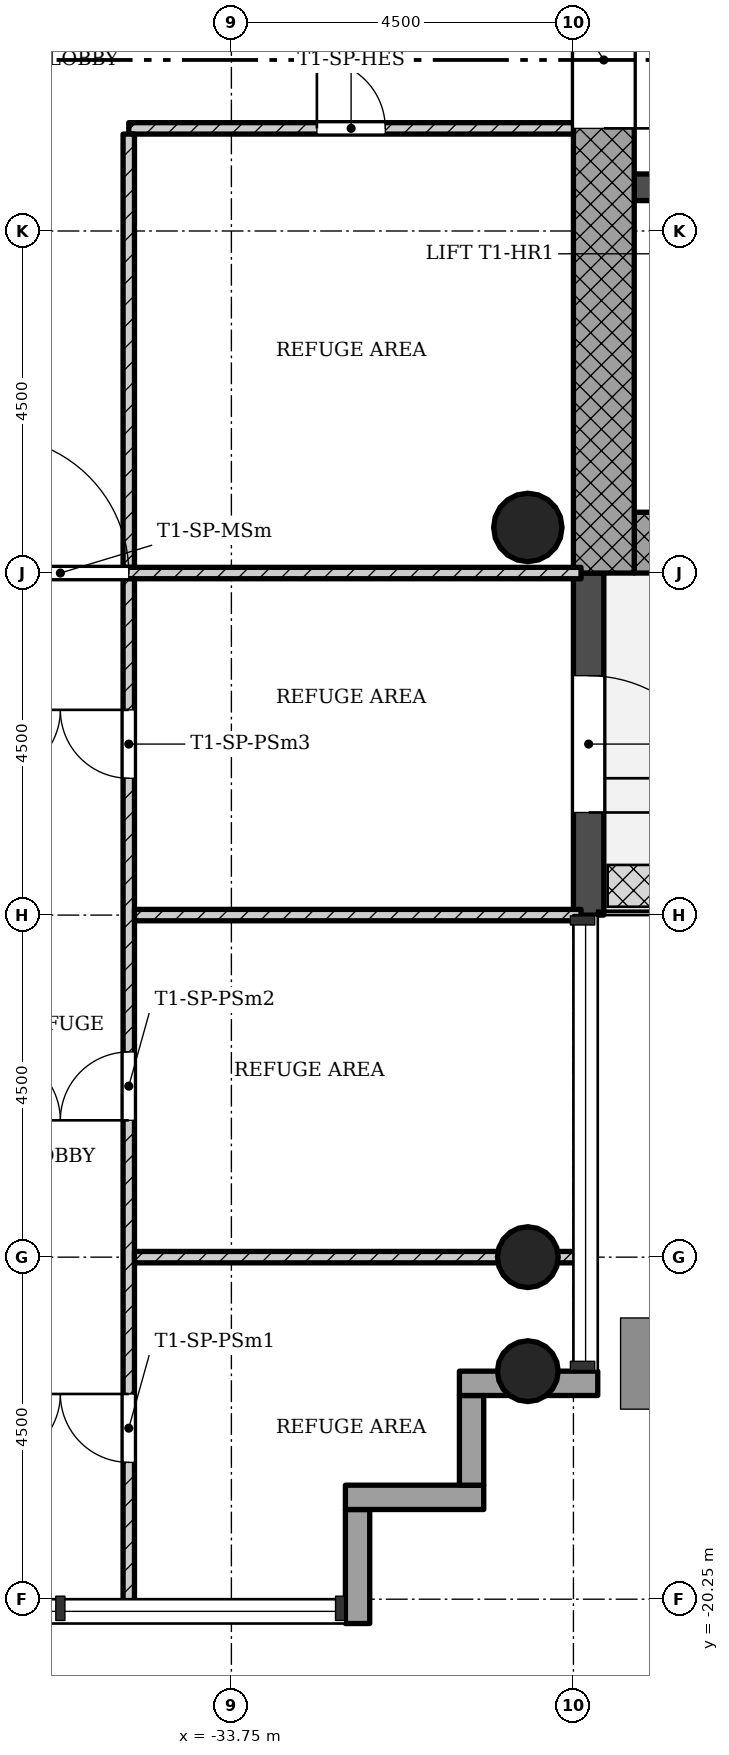
"""IFC4 building model, lengths in metres.
Left out: names, types, materials, properties, quantities, classifications, styles, units other than length and angle.
Written with IfcOpenShell. Run it as: python <this file> out.ifc"""

import sys

from ifc_helpers import new_model, si_unit, direction, frame, frame_2d, origin, origin_2d, place, context, subcontext, project, spatial, rectangle, hollow_circle, extrude, element, fill, save


model = new_model("IFC4")
c1 = context("Model", 3, precision=1e-05, world=origin(), true_north=direction((0.0, 1.0)))
c2 = subcontext(c1, "Body", "Model", "MODEL_VIEW")
j1 = project(units=[si_unit("LENGTHUNIT", "METRE"), si_unit("PLANEANGLEUNIT", "RADIAN")], contexts=[c1])
p1 = place(None, origin())
s1 = spatial("IfcSite", under=j1, at=p1, CompositionType="ELEMENT")
p2 = place(p1, origin())
s2 = spatial("IfcBuilding", under=s1, at=p2, CompositionType="ELEMENT")
p3 = place(p2, frame((0.0, 0.0, 181.3)))
s3 = spatial("IfcBuildingStorey", under=s2, at=p3, CompositionType="ELEMENT", Elevation=181.3)
p4 = place(p3, frame((-28.45, -6.35, 0.0), z_axis=(0.0, 0.0, 1.0), x_axis=(1.0, 0.0, 0.0)))
e1 = element("IfcWall", 1, at=p4, inside=s3, PredefinedType="SHEAR", context=c2, shape_type="SweptSolid", body=[
    extrude(rectangle(XDim=8.2, YDim=0.8, at=frame_2d((4.1, 0.0))), origin(), (0.0, 0.0, 1.0), 4.5),
])
p5 = place(p3, frame((-28.85, 5.95, 0.0), z_axis=(0.0, 0.0, 1.0), x_axis=(0.0, -1.0, 0.0)))
e2 = element("IfcWall", 2, at=p5, inside=s3, PredefinedType="SHEAR", context=c2, shape_type="SweptSolid", body=[
    extrude(rectangle(XDim=12.7, YDim=0.8, at=frame_2d((6.35, 0.0))), origin(), (0.0, 0.0, 1.0), 4.5),
])
p6 = place(p5, frame((5.05, 0.0, 0.0)))
e3 = element("IfcOpeningElement", 3, at=p6, cuts=e2, PredefinedType="OPENING", context=c2, shape_type="SweptSolid", body=[
    extrude(rectangle(XDim=1.8, YDim=2.1, at=frame_2d((0.9, 1.05))), frame((0.0, 0.41, 0.0), z_axis=(0.0, -1.0, 0.0), x_axis=(1.0, 0.0, 0.0)), (0.0, 0.0, 1.0), 0.82),
])
p7 = place(p3, frame((-28.45, -1.675, 0.0), z_axis=(0.0, 0.0, 1.0), x_axis=(1.0, 0.0, 0.0)))
e4 = element("IfcWall", 4, at=p7, inside=s3, PredefinedType="SHEAR", context=c2, shape_type="SweptSolid", body=[
    extrude(rectangle(XDim=7.4, YDim=0.35, at=frame_2d((3.7, 0.0))), origin(), (0.0, 0.0, 1.0), 4.5),
])
p8 = place(p7, frame((0.95, 0.0, 0.0)))
e5 = element("IfcOpeningElement", 5, at=p8, cuts=e4, PredefinedType="OPENING", context=c2, shape_type="SweptSolid", body=[
    extrude(rectangle(XDim=1.1, YDim=2.1, at=frame_2d((0.55, 1.05))), frame((0.0, 0.185, 0.0), z_axis=(0.0, -1.0, 0.0), x_axis=(1.0, 0.0, 0.0)), (0.0, 0.0, 1.0), 0.37),
])
p9 = place(p7, frame((3.15, 0.0, 0.0)))
e6 = element("IfcOpeningElement", 6, at=p9, cuts=e4, PredefinedType="OPENING", context=c2, shape_type="SweptSolid", body=[
    extrude(rectangle(XDim=1.1, YDim=2.1, at=frame_2d((0.55, 1.05))), frame((0.0, 0.185, 0.0), z_axis=(0.0, -1.0, 0.0), x_axis=(1.0, 0.0, 0.0)), (0.0, 0.0, 1.0), 0.37),
])
p10 = place(p7, frame((5.35, 0.0, 0.0)))
e7 = element("IfcOpeningElement", 7, at=p10, cuts=e4, PredefinedType="OPENING", context=c2, shape_type="SweptSolid", body=[
    extrude(rectangle(XDim=1.1, YDim=2.1, at=frame_2d((0.55, 1.05))), frame((0.0, 0.185, 0.0), z_axis=(0.0, -1.0, 0.0), x_axis=(1.0, 0.0, 0.0)), (0.0, 0.0, 1.0), 0.37),
])
for number, where, z_axis, x_axis in (
    (8, (-29.85, -15.75, 0.0), (0.0, 0.0, 1.0), (1.0, 0.0, 0.0)),
    (9, (-29.85, -17.25, 0.0), (0.0, 0.0, 1.0), (1.0, 0.0, 0.0)),
):
    element("IfcColumn", number, at=place(p3, frame(where, z_axis=z_axis, x_axis=x_axis)), inside=s3, PredefinedType="COLUMN", context=c2, shape_type="SweptSolid", body=[
        extrude(hollow_circle(Radius=0.4, WallThickness=0.028, at=origin_2d()), origin(), (0.0, 0.0, 1.0), 4.5),
    ])
p11 = place(p3, frame((-29.85, -6.15, 0.0), z_axis=(0.0, 0.0, 1.0), x_axis=(1.0, 0.0, 0.0)))
e10 = element("IfcColumn", 10, at=p11, inside=s3, PredefinedType="COLUMN", context=c2, shape_type="SweptSolid", body=[
    extrude(hollow_circle(Radius=0.45, WallThickness=0.032, at=origin_2d()), origin(), (0.0, 0.0, 1.0), 4.5),
])
p12 = place(p3, frame((-32.09, -20.57, -0.3), z_axis=(0.0, 0.0, 1.0), x_axis=(0.0, 1.0, 0.0)))
e11 = element("IfcWall", 11, at=p12, inside=s3, PredefinedType="STANDARD", context=c2, shape_type="SweptSolid", body=[
    extrude(rectangle(XDim=1.5, YDim=0.32, at=frame_2d((0.75, 0.0))), origin(), (0.0, 0.0, 1.0), 4.5),
])
p13 = place(p3, frame((-32.25, -18.91, -0.3), z_axis=(0.0, 0.0, 1.0), x_axis=(1.0, 0.0, 0.0)))
e12 = element("IfcWall", 12, at=p13, inside=s3, PredefinedType="STANDARD", context=c2, shape_type="SweptSolid", body=[
    extrude(rectangle(XDim=1.82, YDim=0.32, at=frame_2d((0.91, 0.0))), origin(), (0.0, 0.0, 1.0), 4.5),
])
p14 = place(p3, frame((-30.59, -18.75, -0.3), z_axis=(0.0, 0.0, 1.0), x_axis=(0.0, 1.0, 0.0)))
e13 = element("IfcWall", 13, at=p14, inside=s3, PredefinedType="STANDARD", context=c2, shape_type="SweptSolid", body=[
    extrude(rectangle(XDim=1.18, YDim=0.32, at=frame_2d((0.59, 0.0))), origin(), (0.0, 0.0, 1.0), 4.5),
])
p15 = place(p3, frame((-30.75, -17.41, -0.3), z_axis=(0.0, 0.0, 1.0), x_axis=(1.0, 0.0, 0.0)))
e14 = element("IfcWall", 14, at=p15, inside=s3, PredefinedType="STANDARD", context=c2, shape_type="SweptSolid", body=[
    extrude(rectangle(XDim=1.82, YDim=0.32, at=frame_2d((0.91, 0.0))), origin(), (0.0, 0.0, 1.0), 4.5),
])
p16 = place(p3, frame((-29.05, -11.25, -0.02), z_axis=(0.0, 0.0, 1.0), x_axis=(0.0, 1.0, 0.0)))
e15 = element("IfcWall", 15, at=p16, inside=s3, PredefinedType="STANDARD", context=c2, shape_type="SweptSolid", body=[
    extrude(rectangle(XDim=4.5, YDim=0.4, at=frame_2d((2.25, 0.0))), origin(), (0.0, 0.0, 1.0), 4.22),
])
p17 = place(p16, frame((1.35, 0.0, 0.02)))
e16 = element("IfcOpeningElement", 16, at=p17, cuts=e15, PredefinedType="OPENING", context=c2, shape_type="SweptSolid", body=[
    extrude(rectangle(XDim=1.8, YDim=2.1, at=frame_2d((0.9, 1.05))), frame((0.0, 0.21, 0.0), z_axis=(0.0, -1.0, 0.0), x_axis=(1.0, 0.0, 0.0)), (0.0, 0.0, 1.0), 0.42),
])
p18 = place(p3, frame((-35.1, -0.9, 0.0), z_axis=(0.0, 0.0, 1.0), x_axis=(1.0, 0.0, 0.0)))
e17 = element("IfcWall", 17, at=p18, inside=s3, PredefinedType="PARTITIONING", context=c2, shape_type="SweptSolid", body=[
    extrude(rectangle(XDim=5.85, YDim=0.15, at=frame_2d((2.925, 0.0))), origin(), (0.0, 0.0, 1.0), 4.08),
])
p19 = place(p18, frame((2.475, 0.0, 0.0)))
e18 = element("IfcOpeningElement", 18, at=p19, cuts=e17, PredefinedType="OPENING", context=c2, shape_type="SweptSolid", body=[
    extrude(rectangle(XDim=0.9, YDim=2.1, at=frame_2d((0.45, 1.05))), frame((0.0, 0.085, 0.0), z_axis=(0.0, -1.0, 0.0), x_axis=(1.0, 0.0, 0.0)), (0.0, 0.0, 1.0), 0.17),
])
p20 = place(p3, frame((-35.1, -6.675, 0.0), z_axis=(0.0, 0.0, 1.0), x_axis=(0.0, 1.0, 0.0)))
e19 = element("IfcWall", 19, at=p20, inside=s3, PredefinedType="PARTITIONING", context=c2, shape_type="SweptSolid", body=[
    extrude(rectangle(XDim=5.7, YDim=0.15, at=frame_2d((2.85, 0.0))), origin(), (0.0, 0.0, 1.0), 4.08),
])
p21 = place(p3, frame((-42.85, -6.75, 0.0), z_axis=(0.0, 0.0, 1.0), x_axis=(1.0, 0.0, 0.0)))
e20 = element("IfcWall", 20, at=p21, inside=s3, PredefinedType="PARTITIONING", context=c2, shape_type="SweptSolid", body=[
    extrude(rectangle(XDim=13.7, YDim=0.15, at=frame_2d((6.85, 0.0))), origin(), (0.0, 0.0, 1.0), 4.08),
])
p22 = place(p21, frame((5.95, 0.0, 0.0)))
e21 = element("IfcOpeningElement", 21, at=p22, cuts=e20, PredefinedType="OPENING", context=c2, shape_type="SweptSolid", body=[
    extrude(rectangle(XDim=1.8, YDim=2.1, at=frame_2d((0.9, 1.05))), frame((0.0, 0.085, 0.0), z_axis=(0.0, -1.0, 0.0), x_axis=(1.0, 0.0, 0.0)), (0.0, 0.0, 1.0), 0.17),
])
p23 = place(p3, frame((-35.1, -20.35, 0.0), z_axis=(0.0, 0.0, 1.0), x_axis=(0.0, 1.0, 0.0)))
e22 = element("IfcWall", 22, at=p23, inside=s3, PredefinedType="PARTITIONING", context=c2, shape_type="SweptSolid", body=[
    extrude(rectangle(XDim=13.525, YDim=0.15, at=frame_2d((6.763, 0.0))), origin(), (0.0, 0.0, 1.0), 4.08),
])
p24 = place(p23, frame((1.9, 0.0, 0.0)))
e23 = element("IfcOpeningElement", 23, at=p24, cuts=e22, PredefinedType="OPENING", context=c2, shape_type="SweptSolid", body=[
    extrude(rectangle(XDim=0.9, YDim=2.1, at=frame_2d((0.45, 1.05))), frame((0.0, 0.085, 0.0), z_axis=(0.0, -1.0, 0.0), x_axis=(1.0, 0.0, 0.0)), (0.0, 0.0, 1.0), 0.17),
])
p25 = place(p23, frame((6.4, 0.0, 0.0)))
e24 = element("IfcOpeningElement", 24, at=p25, cuts=e22, PredefinedType="OPENING", context=c2, shape_type="SweptSolid", body=[
    extrude(rectangle(XDim=0.9, YDim=2.1, at=frame_2d((0.45, 1.05))), frame((0.0, 0.085, 0.0), z_axis=(0.0, -1.0, 0.0), x_axis=(1.0, 0.0, 0.0)), (0.0, 0.0, 1.0), 0.17),
])
p26 = place(p23, frame((10.9, 0.0, 0.0)))
e25 = element("IfcOpeningElement", 25, at=p26, cuts=e22, PredefinedType="OPENING", context=c2, shape_type="SweptSolid", body=[
    extrude(rectangle(XDim=0.9, YDim=2.1, at=frame_2d((0.45, 1.05))), frame((0.0, 0.085, 0.0), z_axis=(0.0, -1.0, 0.0), x_axis=(1.0, 0.0, 0.0)), (0.0, 0.0, 1.0), 0.17),
])
for number, where, z_axis, x_axis in (
    (26, (-35.025, -15.75, 0.0), (0.0, 0.0, 1.0), (1.0, 0.0, 0.0)),
    (27, (-35.025, -11.25, 0.0), (0.0, 0.0, 1.0), (1.0, 0.0, 0.0)),
):
    element("IfcWall", number, at=place(p3, frame(where, z_axis=z_axis, x_axis=x_axis)), inside=s3, PredefinedType="PARTITIONING", context=c2, shape_type="SweptSolid", body=[
        extrude(rectangle(XDim=5.875, YDim=0.15, at=frame_2d((2.938, 0.0))), origin(), (0.0, 0.0, 1.0), 4.08),
    ])
p27 = place(p17, origin())
e28 = element("IfcDoor", 28, at=p27, inside=s3, OperationType="SINGLE_SWING_LEFT", PredefinedType="DOOR", context=c2, shape_type="SweptSolid", body=[
    extrude(rectangle(XDim=1.8, YDim=2.1, at=frame_2d((0.9, 1.05))), frame((0.0, 0.025, 0.0), z_axis=(0.0, -1.0, 0.0), x_axis=(1.0, 0.0, 0.0)), (0.0, 0.0, 1.0), 0.05),
])
fill(e16, e28)
p28 = place(p19, origin())
e29 = element("IfcDoor", 29, at=p28, inside=s3, OperationType="SINGLE_SWING_RIGHT", PredefinedType="DOOR", context=c2, shape_type="SweptSolid", body=[
    extrude(rectangle(XDim=0.9, YDim=2.1, at=frame_2d((0.45, 1.05))), frame((0.0, 0.025, 0.0), z_axis=(0.0, -1.0, 0.0), x_axis=(1.0, 0.0, 0.0)), (0.0, 0.0, 1.0), 0.05),
])
fill(e18, e29)
p29 = place(p22, origin())
e30 = element("IfcDoor", 30, at=p29, inside=s3, OperationType="SINGLE_SWING_RIGHT", PredefinedType="DOOR", context=c2, shape_type="SweptSolid", body=[
    extrude(rectangle(XDim=1.8, YDim=2.1, at=frame_2d((0.9, 1.05))), frame((0.0, 0.025, 0.0), z_axis=(0.0, -1.0, 0.0), x_axis=(1.0, 0.0, 0.0)), (0.0, 0.0, 1.0), 0.05),
])
fill(e21, e30)
p30 = place(p24, origin())
e31 = element("IfcDoor", 31, at=p30, inside=s3, OperationType="SINGLE_SWING_LEFT", PredefinedType="DOOR", context=c2, shape_type="SweptSolid", body=[
    extrude(rectangle(XDim=0.9, YDim=2.1, at=frame_2d((0.45, 1.05))), frame((0.0, 0.025, 0.0), z_axis=(0.0, -1.0, 0.0), x_axis=(1.0, 0.0, 0.0)), (0.0, 0.0, 1.0), 0.05),
])
fill(e23, e31)
p31 = place(p25, origin())
e32 = element("IfcDoor", 32, at=p31, inside=s3, OperationType="SINGLE_SWING_RIGHT", PredefinedType="DOOR", context=c2, shape_type="SweptSolid", body=[
    extrude(rectangle(XDim=0.9, YDim=2.1, at=frame_2d((0.45, 1.05))), frame((0.0, 0.025, 0.0), z_axis=(0.0, -1.0, 0.0), x_axis=(1.0, 0.0, 0.0)), (0.0, 0.0, 1.0), 0.05),
])
fill(e24, e32)
p32 = place(p26, origin())
e33 = element("IfcDoor", 33, at=p32, inside=s3, OperationType="SINGLE_SWING_LEFT", PredefinedType="DOOR", context=c2, shape_type="SweptSolid", body=[
    extrude(rectangle(XDim=0.9, YDim=2.1, at=frame_2d((0.45, 1.05))), frame((0.0, 0.025, 0.0), z_axis=(0.0, -1.0, 0.0), x_axis=(1.0, 0.0, 0.0)), (0.0, 0.0, 1.0), 0.05),
])
fill(e25, e33)
p33 = place(p6, origin())
e34 = element("IfcDoor", 34, at=p33, inside=s3, OperationType="SINGLE_SWING_LEFT", PredefinedType="DOOR", context=c2, shape_type="SweptSolid", body=[
    extrude(rectangle(XDim=1.8, YDim=2.1, at=frame_2d((0.9, 1.05))), frame((0.0, 0.025, 0.0), z_axis=(0.0, -1.0, 0.0), x_axis=(1.0, 0.0, 0.0)), (0.0, 0.0, 1.0), 0.05),
])
fill(e3, e34)
save(model, sys.argv[1])
